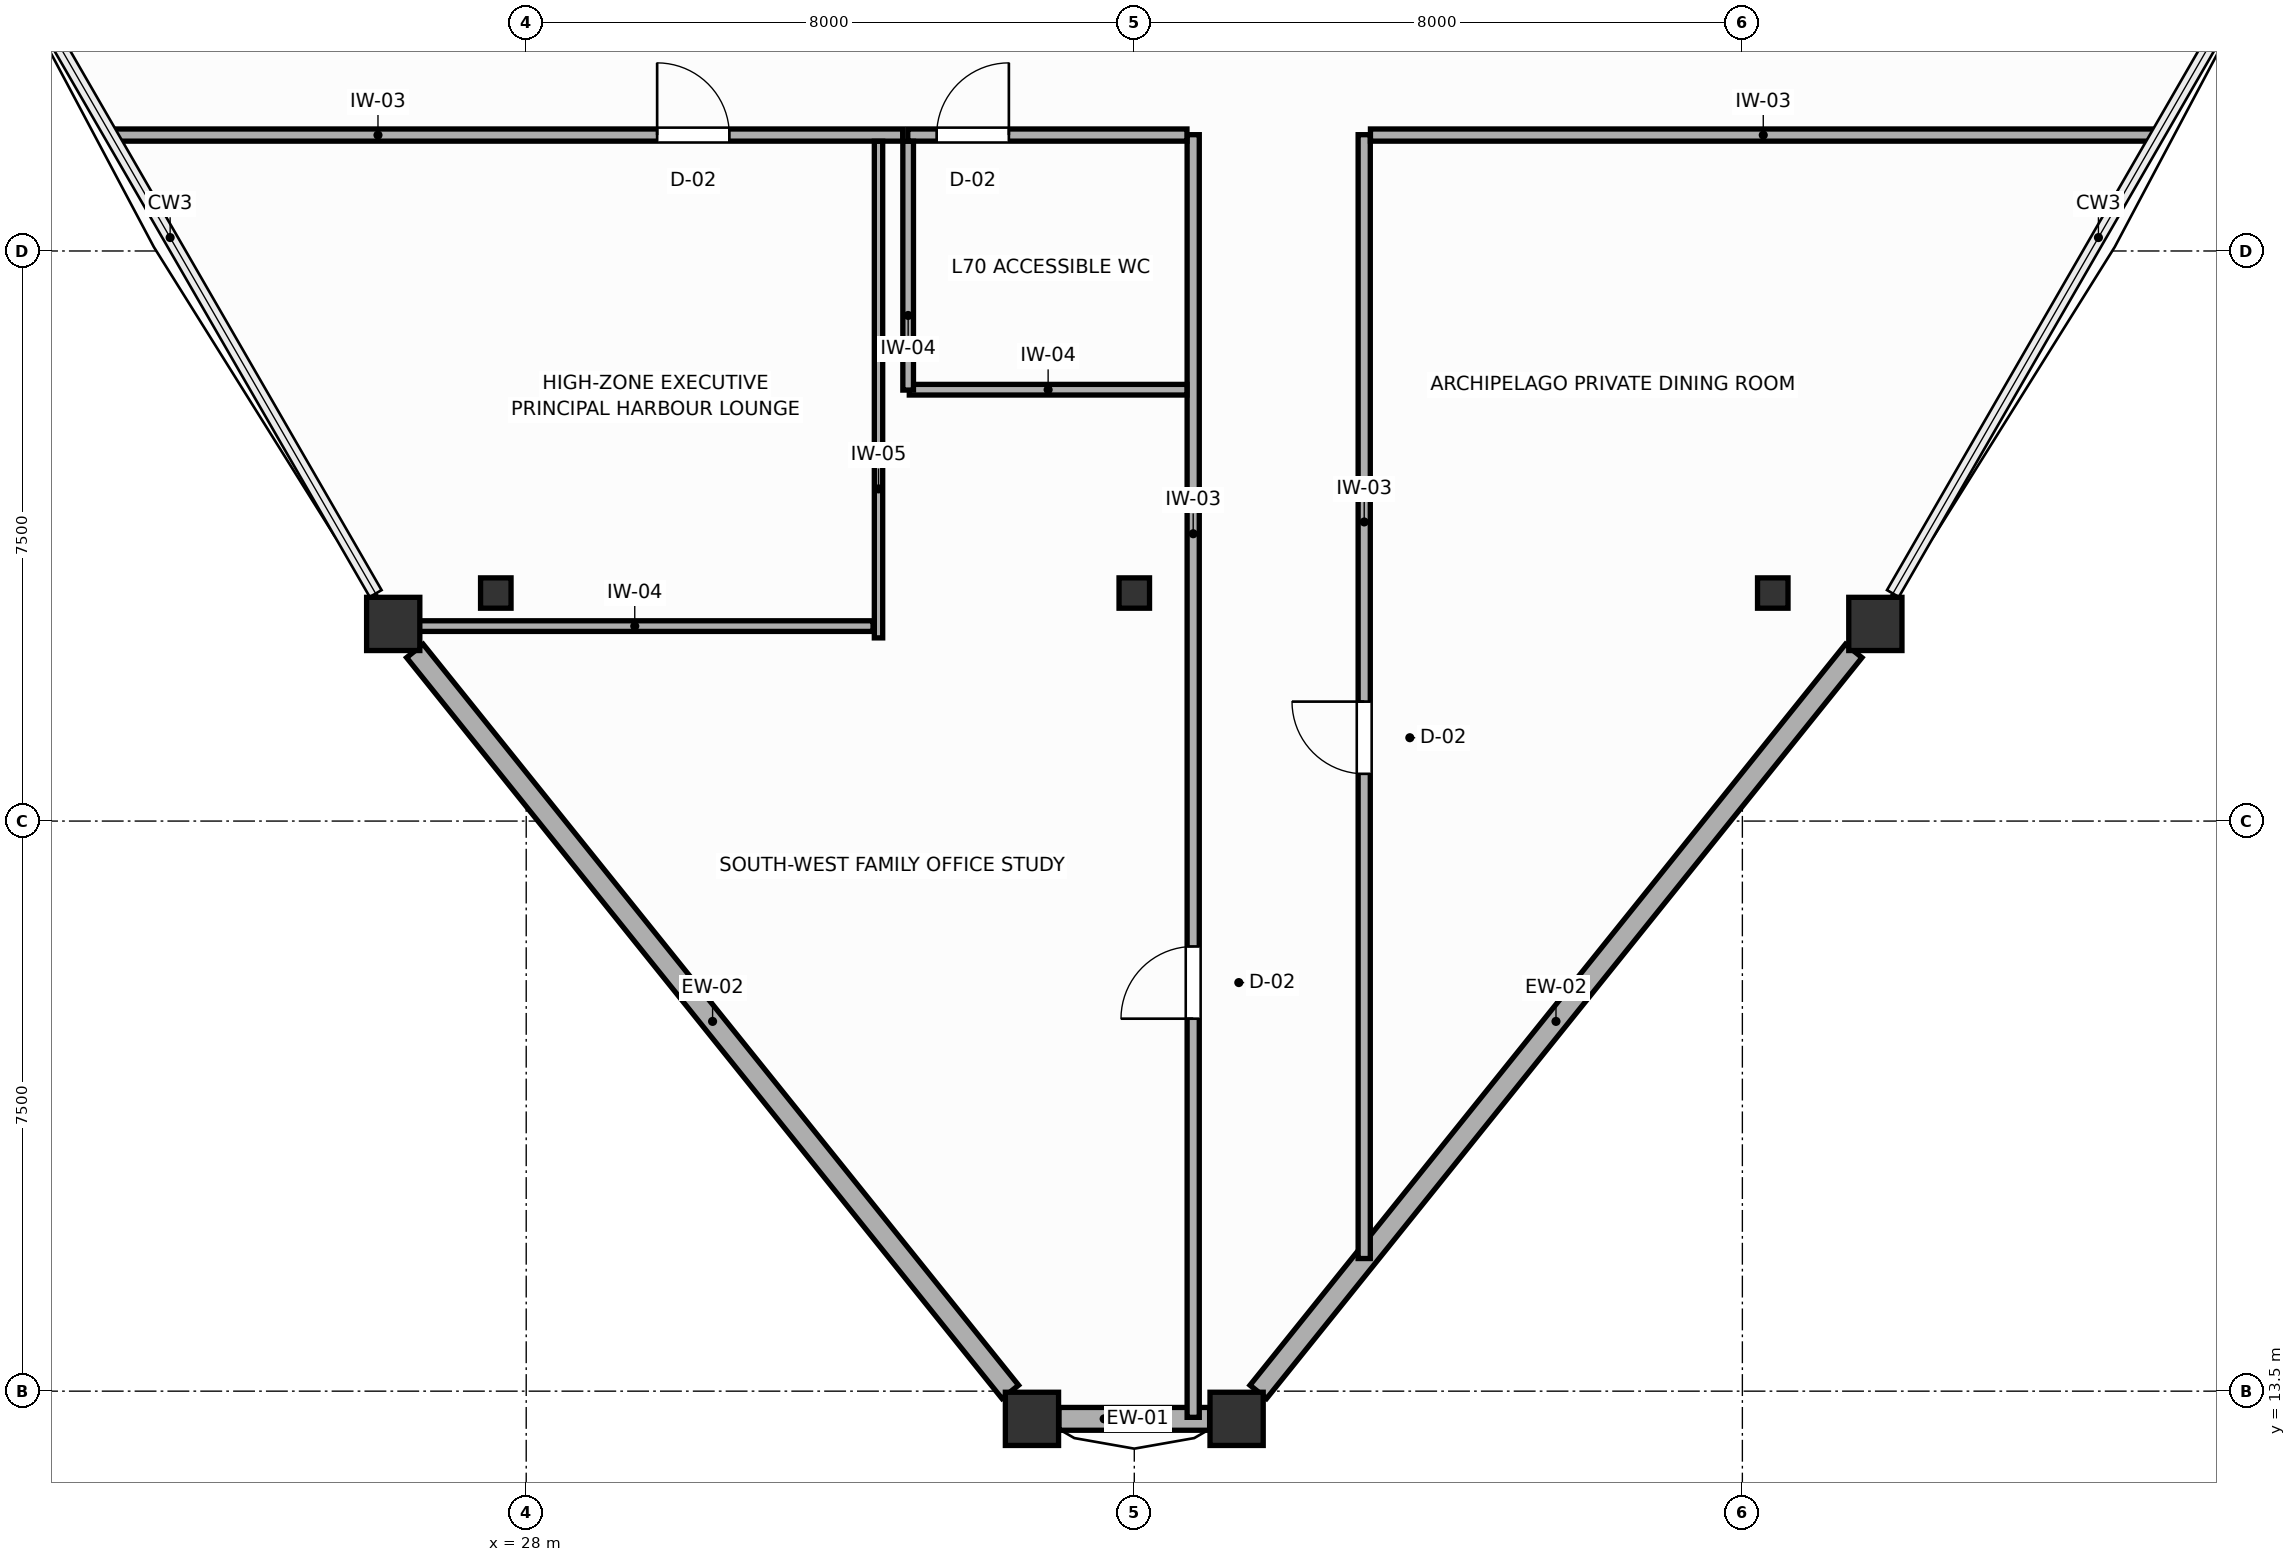
"""IFC4 building model, lengths in metres.
Left out: names, types, materials, properties, quantities, classifications, styles, units other than length and angle.
Written with IfcOpenShell. Run it as: python <this file> out.ifc"""

import sys

from ifc_helpers import new_model, si_unit, direction, frame, frame_2d, origin, origin_2d, place, context, subcontext, project, spatial, rectangle, i_section, extrude, source, transform, mapped, element, fill, save


model = new_model("IFC4")
c1 = context("Model", 3, precision=1e-05, world=origin(), true_north=direction((0.0, 1.0)))
c2 = subcontext(c1, "Body", "Model", "MODEL_VIEW")
j1 = project(units=[si_unit("LENGTHUNIT", "METRE"), si_unit("PLANEANGLEUNIT", "RADIAN")], contexts=[c1])
p1 = place(None, origin())
s1 = spatial("IfcSite", under=j1, at=p1, CompositionType="ELEMENT")
p2 = place(p1, origin())
s2 = spatial("IfcBuilding", under=s1, at=p2, CompositionType="ELEMENT")
p3 = place(p2, frame((0.0, 0.0, 268.2)))
s3 = spatial("IfcBuildingStorey", under=s2, at=p3, CompositionType="ELEMENT", Elevation=268.2)
m1 = source(origin(), c2, "Body", "SweptSolid", [
    extrude(i_section(OverallWidth=0.401, OverallDepth=0.399, WebThickness=0.022, FlangeThickness=0.036, FilletRadius=0.015, at=origin_2d()), origin(), (0.0, 0.0, 1.0), 3.6),
])
for number, where, z_axis, x_axis in (
    (1, (27.6, 24.0, 0.0), (0.0, 0.0, 1.0), (1.0, 0.0, 0.0)),
    (2, (44.4, 24.0, 0.0), (0.0, 0.0, 1.0), (1.0, 0.0, 0.0)),
    (3, (36.0, 24.0, 0.0), (0.0, 0.0, 1.0), (1.0, 0.0, 0.0)),
):
    element("IfcColumn", number, at=place(p3, frame(where, z_axis=z_axis, x_axis=x_axis)), inside=s3, PredefinedType="COLUMN", context=c2, shape_type="MappedRepresentation", body=[
        mapped(m1, transform((0.0, 0.0, 0.0), scale=1.0)),
    ])
m2 = source(origin(), c2, "Body", "SweptSolid", [
    extrude(rectangle(XDim=0.7, YDim=0.7, at=origin_2d()), origin(), (0.0, 0.0, 1.0), 3.6),
])
for number, where, z_axis, x_axis in (
    (4, (26.25, 23.594, 0.0), (0.0, 0.0, 1.0), (1.0, 0.0, 0.0)),
    (5, (34.654, 13.135, 0.0), (0.0, 0.0, 1.0), (1.0, 0.0, 0.0)),
    (6, (37.346, 13.135, 0.0), (0.0, 0.0, 1.0), (1.0, 0.0, 0.0)),
    (7, (45.75, 23.594, 0.0), (0.0, 0.0, 1.0), (1.0, 0.0, 0.0)),
):
    element("IfcColumn", number, at=place(p3, frame(where, z_axis=z_axis, x_axis=x_axis)), inside=s3, PredefinedType="COLUMN", context=c2, shape_type="MappedRepresentation", body=[
        mapped(m2, transform((0.0, 0.0, 0.0), scale=1.0)),
    ])
p4 = place(p3, frame((26.536, 23.239, 0.0), z_axis=(0.0, 0.0, 1.0), x_axis=(0.626367381926, -0.779528000048, 0.0)))
e8 = element("IfcWall", 8, at=p4, inside=s3, PredefinedType="SOLIDWALL", context=c2, shape_type="SweptSolid", body=[
    extrude(rectangle(XDim=12.505, YDim=0.28, at=frame_2d((6.252, 0.0))), origin(), (0.0, 0.0, 1.0), 3.08),
])
p5 = place(p3, frame((35.009, 13.135, 0.0), z_axis=(0.0, 0.0, 1.0), x_axis=(1.0, 0.0, 0.0)))
e9 = element("IfcWall", 9, at=p5, inside=s3, PredefinedType="SOLIDWALL", context=c2, shape_type="SweptSolid", body=[
    extrude(rectangle(XDim=1.982, YDim=0.3, at=frame_2d((0.991, 0.0))), origin(), (0.0, 0.0, 1.0), 3.08),
])
p6 = place(p3, frame((37.632, 13.49, 0.0), z_axis=(0.0, 0.0, 1.0), x_axis=(0.626367381926, 0.779528000048, 0.0)))
e10 = element("IfcWall", 10, at=p6, inside=s3, PredefinedType="SOLIDWALL", context=c2, shape_type="SweptSolid", body=[
    extrude(rectangle(XDim=12.505, YDim=0.28, at=frame_2d((6.252, 0.0))), origin(), (0.0, 0.0, 1.0), 3.05),
])
p7 = place(p3, frame((36.775, 13.156, 0.0), z_axis=(0.0, 0.0, 1.0), x_axis=(0.0, 1.0, 0.0)))
e11 = element("IfcWall", 11, at=p7, inside=s3, PredefinedType="PARTITIONING", context=c2, shape_type="SweptSolid", body=[
    extrude(rectangle(XDim=16.875, YDim=0.16, at=frame_2d((8.437, 0.0))), origin(), (0.0, 0.0, 1.0), 3.08),
])
p8 = place(p7, frame((5.245, 0.0, 0.0)))
e12 = element("IfcOpeningElement", 12, at=p8, cuts=e11, PredefinedType="OPENING", context=c2, shape_type="SweptSolid", body=[
    extrude(rectangle(XDim=0.95, YDim=2.05, at=frame_2d((0.475, 1.025))), frame((0.0, 0.09, 0.0), z_axis=(0.0, -1.0, 0.0), x_axis=(1.0, 0.0, 0.0)), (0.0, 0.0, 1.0), 0.18),
])
p9 = place(p3, frame((39.025, 15.245, 0.0), z_axis=(0.0, 0.0, 1.0), x_axis=(0.0, 1.0, 0.0)))
e13 = element("IfcWall", 13, at=p9, inside=s3, PredefinedType="PARTITIONING", context=c2, shape_type="SweptSolid", body=[
    extrude(rectangle(XDim=14.785, YDim=0.16, at=frame_2d((7.393, 0.0))), origin(), (0.0, 0.0, 1.0), 3.41),
])
p10 = place(p9, frame((6.377, 0.0, 0.0)))
e14 = element("IfcOpeningElement", 14, at=p10, cuts=e13, PredefinedType="OPENING", context=c2, shape_type="SweptSolid", body=[
    extrude(rectangle(XDim=0.95, YDim=2.05, at=frame_2d((0.475, 1.025))), frame((0.0, 0.09, 0.0), z_axis=(0.0, -1.0, 0.0), x_axis=(1.0, 0.0, 0.0)), (0.0, 0.0, 1.0), 0.18),
])
p11 = place(p3, frame((39.107, 30.025, 0.0), z_axis=(0.0, 0.0, 1.0), x_axis=(1.0, 0.0, 0.0)))
e15 = element("IfcWall", 15, at=p11, inside=s3, PredefinedType="PARTITIONING", context=c2, shape_type="SweptSolid", body=[
    extrude(rectangle(XDim=10.336, YDim=0.16, at=frame_2d((5.168, 0.0))), origin(), (0.0, 0.0, 1.0), 3.41),
])
p12 = place(p3, frame((22.557, 30.025, 0.0), z_axis=(0.0, 0.0, 1.0), x_axis=(1.0, 0.0, 0.0)))
e16 = element("IfcWall", 16, at=p12, inside=s3, PredefinedType="PARTITIONING", context=c2, shape_type="SweptSolid", body=[
    extrude(rectangle(XDim=10.396, YDim=0.16, at=frame_2d((5.198, 0.0))), origin(), (0.0, 0.0, 1.0), 3.41),
])
p13 = place(p12, frame((7.166, 0.0, 0.0)))
e17 = element("IfcOpeningElement", 17, at=p13, cuts=e16, PredefinedType="OPENING", context=c2, shape_type="SweptSolid", body=[
    extrude(rectangle(XDim=0.95, YDim=2.05, at=frame_2d((0.475, 1.025))), frame((0.0, 0.09, 0.0), z_axis=(0.0, -1.0, 0.0), x_axis=(1.0, 0.0, 0.0)), (0.0, 0.0, 1.0), 0.18),
])
p14 = place(p3, frame((33.02, 30.025, 0.0), z_axis=(0.0, 0.0, 1.0), x_axis=(1.0, 0.0, 0.0)))
e18 = element("IfcWall", 18, at=p14, inside=s3, PredefinedType="PARTITIONING", context=c2, shape_type="SweptSolid", body=[
    extrude(rectangle(XDim=3.673, YDim=0.16, at=frame_2d((1.836, 0.0))), origin(), (0.0, 0.0, 1.0), 3.41),
])
p15 = place(p14, frame((0.38, 0.0, 0.0)))
e19 = element("IfcOpeningElement", 19, at=p15, cuts=e18, PredefinedType="OPENING", context=c2, shape_type="SweptSolid", body=[
    extrude(rectangle(XDim=0.95, YDim=2.05, at=frame_2d((0.475, 1.025))), frame((0.0, 0.09, 0.0), z_axis=(0.0, -1.0, 0.0), x_axis=(1.0, 0.0, 0.0)), (0.0, 0.0, 1.0), 0.18),
])
p16 = place(p3, frame((32.635, 23.41, 0.0), z_axis=(0.0, 0.0, 1.0), x_axis=(0.0, 1.0, 0.0)))
e20 = element("IfcWall", 20, at=p16, inside=s3, PredefinedType="MOVABLE", context=c2, shape_type="SweptSolid", body=[
    extrude(rectangle(XDim=6.533, YDim=0.11, at=frame_2d((3.267, 0.0))), origin(), (0.0, 0.0, 1.0), 3.41),
])
p17 = place(p3, frame((26.293, 23.565, 0.0), z_axis=(0.0, 0.0, 1.0), x_axis=(1.0, 0.0, 0.0)))
e21 = element("IfcWall", 21, at=p17, inside=s3, PredefinedType="PARTITIONING", context=c2, shape_type="SweptSolid", body=[
    extrude(rectangle(XDim=6.27, YDim=0.14, at=frame_2d((3.135, 0.0))), origin(), (0.0, 0.0, 1.0), 3.08),
])
p18 = place(p3, frame((33.04, 26.675, 0.0), z_axis=(0.0, 0.0, 1.0), x_axis=(1.0, 0.0, 0.0)))
e22 = element("IfcWall", 22, at=p18, inside=s3, PredefinedType="PARTITIONING", context=c2, shape_type="SweptSolid", body=[
    extrude(rectangle(XDim=3.653, YDim=0.14, at=frame_2d((1.827, 0.0))), origin(), (0.0, 0.0, 1.0), 3.41),
])
p19 = place(p3, frame((33.025, 26.67, 0.0), z_axis=(0.0, 0.0, 1.0), x_axis=(0.0, 1.0, 0.0)))
e23 = element("IfcWall", 23, at=p19, inside=s3, PredefinedType="PARTITIONING", context=c2, shape_type="SweptSolid", body=[
    extrude(rectangle(XDim=3.273, YDim=0.14, at=frame_2d((1.637, 0.0))), origin(), (0.0, 0.0, 1.0), 3.41),
])
p20 = place(p8, origin())
e24 = element("IfcDoor", 24, at=p20, inside=s3, OperationType="SINGLE_SWING_LEFT", PredefinedType="DOOR", context=c2, shape_type="SweptSolid", body=[
    extrude(rectangle(XDim=0.95, YDim=2.05, at=frame_2d((0.475, 1.025))), frame((0.0, 0.025, 0.0), z_axis=(0.0, -1.0, 0.0), x_axis=(1.0, 0.0, 0.0)), (0.0, 0.0, 1.0), 0.05),
])
fill(e12, e24)
p21 = place(p10, origin())
e25 = element("IfcDoor", 25, at=p21, inside=s3, OperationType="SINGLE_SWING_RIGHT", PredefinedType="DOOR", context=c2, shape_type="SweptSolid", body=[
    extrude(rectangle(XDim=0.95, YDim=2.05, at=frame_2d((0.475, 1.025))), frame((0.0, 0.025, 0.0), z_axis=(0.0, -1.0, 0.0), x_axis=(1.0, 0.0, 0.0)), (0.0, 0.0, 1.0), 0.05),
])
fill(e14, e25)
p22 = place(p13, origin())
e26 = element("IfcDoor", 26, at=p22, inside=s3, OperationType="SINGLE_SWING_LEFT", PredefinedType="DOOR", context=c2, shape_type="SweptSolid", body=[
    extrude(rectangle(XDim=0.95, YDim=2.05, at=frame_2d((0.475, 1.025))), frame((0.0, 0.025, 0.0), z_axis=(0.0, -1.0, 0.0), x_axis=(1.0, 0.0, 0.0)), (0.0, 0.0, 1.0), 0.05),
])
fill(e17, e26)
p23 = place(p15, origin())
e27 = element("IfcDoor", 27, at=p23, inside=s3, OperationType="SINGLE_SWING_RIGHT", PredefinedType="DOOR", context=c2, shape_type="SweptSolid", body=[
    extrude(rectangle(XDim=0.95, YDim=2.05, at=frame_2d((0.475, 1.025))), frame((0.0, 0.025, 0.0), z_axis=(0.0, -1.0, 0.0), x_axis=(1.0, 0.0, 0.0)), (0.0, 0.0, 1.0), 0.05),
])
fill(e19, e27)
save(model, sys.argv[1])
